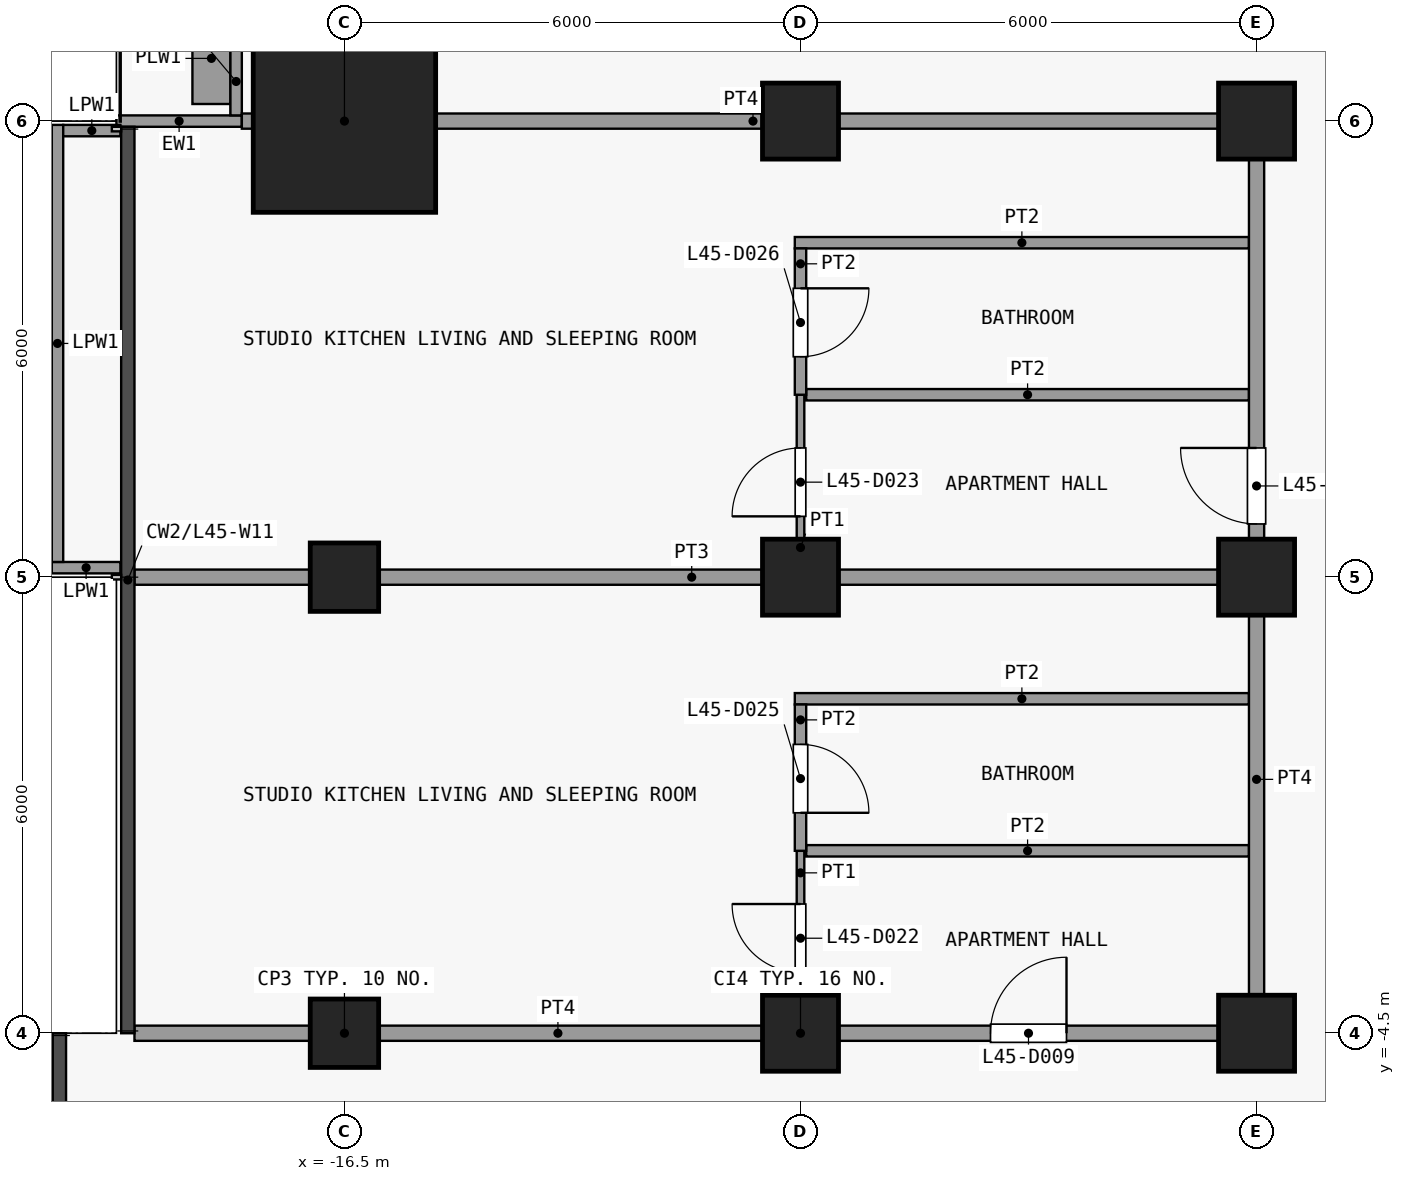
"""IFC4 building model, lengths in metres.
Left out: names, types, materials, properties, quantities, classifications, styles, units other than length and angle.
Written with IfcOpenShell. Run it as: python <this file> out.ifc"""

import sys

from ifc_helpers import new_model, si_unit, direction, frame, frame_2d, origin, origin_2d, place, context, subcontext, project, spatial, rectangle, extrude, element, fill, save


model = new_model("IFC4")
c1 = context("Model", 3, precision=1e-05, world=origin(), true_north=direction((0.0, 1.0)))
c2 = subcontext(c1, "Body", "Model", "MODEL_VIEW")
j1 = project(units=[si_unit("LENGTHUNIT", "METRE"), si_unit("PLANEANGLEUNIT", "RADIAN")], contexts=[c1])
p1 = place(None, origin())
s1 = spatial("IfcSite", under=j1, at=p1, CompositionType="ELEMENT")
p2 = place(p1, origin())
s2 = spatial("IfcBuilding", under=s1, at=p2, CompositionType="ELEMENT")
p3 = place(p2, frame((0.0, 0.0, 181.7)))
s3 = spatial("IfcBuildingStorey", under=s2, at=p3, CompositionType="ELEMENT", Elevation=181.7)
for number, where, z_axis, x_axis in (
    (1, (-16.5, -4.5, 0.0), (0.0, 0.0, 1.0), (1.0, 0.0, 0.0)),
    (2, (-16.5, 1.5, 0.0), (0.0, 0.0, 1.0), (1.0, 0.0, 0.0)),
):
    element("IfcColumn", number, at=place(p3, frame(where, z_axis=z_axis, x_axis=x_axis)), inside=s3, PredefinedType="COLUMN", context=c2, shape_type="SweptSolid", body=[
        extrude(rectangle(XDim=0.9, YDim=0.9, at=origin_2d()), origin(), (0.0, 0.0, 1.0), 3.6),
    ])
p4 = place(p3, frame((-16.5, 7.5, 0.0), z_axis=(0.0, 0.0, 1.0), x_axis=(1.0, 0.0, 0.0)))
e3 = element("IfcColumn", 3, at=p4, inside=s3, PredefinedType="COLUMN", context=c2, shape_type="SweptSolid", body=[
    extrude(rectangle(XDim=2.4, YDim=2.4, at=origin_2d()), origin(), (0.0, 0.0, 1.0), 3.6),
])
for number, where, z_axis, x_axis in (
    (4, (-10.5, -4.5, 0.0), (0.0, 0.0, 1.0), (1.0, 0.0, 0.0)),
    (5, (-10.5, 1.5, 0.0), (0.0, 0.0, 1.0), (1.0, 0.0, 0.0)),
    (6, (-10.5, 7.5, 0.0), (0.0, 0.0, 1.0), (1.0, 0.0, 0.0)),
    (7, (-4.5, -4.5, 0.0), (0.0, 0.0, 1.0), (1.0, 0.0, 0.0)),
    (8, (-4.5, 1.5, 0.0), (0.0, 0.0, 1.0), (1.0, 0.0, 0.0)),
    (9, (-4.5, 7.5, 0.0), (0.0, 0.0, 1.0), (1.0, 0.0, 0.0)),
):
    element("IfcColumn", number, at=place(p3, frame(where, z_axis=z_axis, x_axis=x_axis)), inside=s3, PredefinedType="COLUMN", context=c2, shape_type="SweptSolid", body=[
        extrude(rectangle(XDim=1.0, YDim=1.0, at=origin_2d()), origin(), (0.0, 0.0, 1.0), 3.6),
    ])
p5 = place(p3, frame((-17.85, 7.5, 0.0), z_axis=(0.0, 0.0, 1.0), x_axis=(-1.0, 0.0, 0.0)))
e10 = element("IfcWall", 10, at=p5, inside=s3, PredefinedType="SOLIDWALL", context=c2, shape_type="SweptSolid", body=[
    extrude(rectangle(XDim=1.65, YDim=0.15, at=frame_2d((0.825, 0.0))), origin(), (0.0, 0.0, 1.0), 3.3),
])
p6 = place(p3, frame((-17.925, 7.575, 0.0), z_axis=(0.0, 0.0, 1.0), x_axis=(0.0, 1.0, 0.0)))
e11 = element("IfcWall", 11, at=p6, inside=s3, PredefinedType="SOLIDWALL", context=c2, shape_type="SweptSolid", body=[
    extrude(rectangle(XDim=5.85, YDim=0.15, at=frame_2d((2.925, 0.0))), origin(), (0.0, 0.0, 1.0), 3.3),
])
p7 = place(p6, frame((3.825, 0.0, 0.0)))
e12 = element("IfcOpeningElement", 12, at=p7, cuts=e11, PredefinedType="OPENING", context=c2, shape_type="SweptSolid", body=[
    extrude(rectangle(XDim=1.2, YDim=2.4, at=frame_2d((0.6, 1.2))), frame((0.0, 0.085, 0.0), z_axis=(0.0, -1.0, 0.0), x_axis=(1.0, 0.0, 0.0)), (0.0, 0.0, 1.0), 0.17),
])
p8 = place(p6, frame((1.012, 0.0, 0.9)))
e13 = element("IfcOpeningElement", 13, at=p8, cuts=e11, PredefinedType="OPENING", context=c2, shape_type="SweptSolid", body=[
    extrude(rectangle(XDim=1.8, YDim=2.1, at=frame_2d((0.9, 1.05))), frame((0.0, 0.085, 0.0), z_axis=(0.0, -1.0, 0.0), x_axis=(1.0, 0.0, 0.0)), (0.0, 0.0, 1.0), 0.17),
])
p9 = place(p3, frame((-18.25, 7.725, 0.0), z_axis=(0.0, 0.0, 1.0), x_axis=(0.0, 1.0, 0.0)))
e14 = element("IfcWall", 14, at=p9, inside=s3, PredefinedType="USERDEFINED", context=c2, shape_type="SweptSolid", body=[
    extrude(rectangle(XDim=1.2, YDim=0.5, at=frame_2d((0.6, 0.0))), origin(), (0.0, 0.0, 1.0), 0.9),
])
p10 = place(p3, frame((-19.448, 1.625, 0.0), z_axis=(0.0, 0.0, 1.0), x_axis=(-1.0, 0.0, 0.0)))
e15 = element("IfcWall", 15, at=p10, inside=s3, PredefinedType="PARAPET", context=c2, shape_type="SweptSolid", body=[
    extrude(rectangle(XDim=0.903, YDim=0.15, at=frame_2d((0.451, 0.0))), origin(), (0.0, 0.0, 1.0), 1.15),
])
p11 = place(p3, frame((-20.275, 1.7, 0.0), z_axis=(0.0, 0.0, 1.0), x_axis=(0.0, 1.0, 0.0)))
e16 = element("IfcWall", 16, at=p11, inside=s3, PredefinedType="PARAPET", context=c2, shape_type="SweptSolid", body=[
    extrude(rectangle(XDim=5.75, YDim=0.15, at=frame_2d((2.875, 0.0))), origin(), (0.0, 0.0, 1.0), 1.15),
])
p12 = place(p3, frame((-20.2, 7.375, 0.0), z_axis=(0.0, 0.0, 1.0), x_axis=(1.0, 0.0, 0.0)))
e17 = element("IfcWall", 17, at=p12, inside=s3, PredefinedType="PARAPET", context=c2, shape_type="SweptSolid", body=[
    extrude(rectangle(XDim=0.752, YDim=0.15, at=frame_2d((0.376, 0.0))), origin(), (0.0, 0.0, 1.0), 1.15),
])
p13 = place(p3, frame((-19.262, -4.5, 0.0), z_axis=(0.0, 0.0, 1.0), x_axis=(1.0, 0.0, 0.0)))
e18 = element("IfcWall", 18, at=p13, inside=s3, PredefinedType="PARTITIONING", context=c2, shape_type="SweptSolid", body=[
    extrude(rectangle(XDim=14.863, YDim=0.2, at=frame_2d((7.431, 0.0))), origin(), (0.0, 0.0, 1.0), 3.3),
])
p14 = place(p13, frame((11.262, 0.0, 0.0)))
e19 = element("IfcOpeningElement", 19, at=p14, cuts=e18, PredefinedType="OPENING", context=c2, shape_type="SweptSolid", body=[
    extrude(rectangle(XDim=1.0, YDim=2.1, at=frame_2d((0.5, 1.05))), frame((0.0, 0.11, 0.0), z_axis=(0.0, -1.0, 0.0), x_axis=(1.0, 0.0, 0.0)), (0.0, 0.0, 1.0), 0.22),
])
p15 = place(p3, frame((-10.425, -2.1, 0.0), z_axis=(0.0, 0.0, 1.0), x_axis=(1.0, 0.0, 0.0)))
e20 = element("IfcWall", 20, at=p15, inside=s3, PredefinedType="PARTITIONING", context=c2, shape_type="SweptSolid", body=[
    extrude(rectangle(XDim=5.825, YDim=0.15, at=frame_2d((2.913, 0.0))), origin(), (0.0, 0.0, 1.0), 3.3),
])
p16 = place(p3, frame((-10.575, -0.1, 0.0), z_axis=(0.0, 0.0, 1.0), x_axis=(1.0, 0.0, 0.0)))
e21 = element("IfcWall", 21, at=p16, inside=s3, PredefinedType="PARTITIONING", context=c2, shape_type="SweptSolid", body=[
    extrude(rectangle(XDim=5.975, YDim=0.15, at=frame_2d((2.987, 0.0))), origin(), (0.0, 0.0, 1.0), 3.3),
])
p17 = place(p3, frame((-19.262, 1.5, 0.0), z_axis=(0.0, 0.0, 1.0), x_axis=(1.0, 0.0, 0.0)))
e22 = element("IfcWall", 22, at=p17, inside=s3, PredefinedType="PARTITIONING", context=c2, shape_type="SweptSolid", body=[
    extrude(rectangle(XDim=14.662, YDim=0.2, at=frame_2d((7.331, 0.0))), origin(), (0.0, 0.0, 1.0), 3.3),
])
p18 = place(p3, frame((-10.425, 3.9, 0.0), z_axis=(0.0, 0.0, 1.0), x_axis=(1.0, 0.0, 0.0)))
e23 = element("IfcWall", 23, at=p18, inside=s3, PredefinedType="PARTITIONING", context=c2, shape_type="SweptSolid", body=[
    extrude(rectangle(XDim=5.825, YDim=0.15, at=frame_2d((2.913, 0.0))), origin(), (0.0, 0.0, 1.0), 3.3),
])
p19 = place(p3, frame((-10.575, 5.9, 0.0), z_axis=(0.0, 0.0, 1.0), x_axis=(1.0, 0.0, 0.0)))
e24 = element("IfcWall", 24, at=p19, inside=s3, PredefinedType="PARTITIONING", context=c2, shape_type="SweptSolid", body=[
    extrude(rectangle(XDim=5.975, YDim=0.15, at=frame_2d((2.987, 0.0))), origin(), (0.0, 0.0, 1.0), 3.3),
])
p20 = place(p3, frame((-17.85, 7.5, 0.0), z_axis=(0.0, 0.0, 1.0), x_axis=(1.0, 0.0, 0.0)))
e25 = element("IfcWall", 25, at=p20, inside=s3, PredefinedType="PARTITIONING", context=c2, shape_type="SweptSolid", body=[
    extrude(rectangle(XDim=13.45, YDim=0.2, at=frame_2d((6.725, 0.0))), origin(), (0.0, 0.0, 1.0), 3.3),
])
p21 = place(p3, frame((-10.5, -4.4, 0.0), z_axis=(0.0, 0.0, 1.0), x_axis=(0.0, 1.0, 0.0)))
e26 = element("IfcWall", 26, at=p21, inside=s3, PredefinedType="PARTITIONING", context=c2, shape_type="SweptSolid", body=[
    extrude(rectangle(XDim=2.3, YDim=0.1, at=frame_2d((1.15, 0.0))), origin(), (0.0, 0.0, 1.0), 3.3),
])
p22 = place(p21, frame((0.7, 0.0, 0.0)))
e27 = element("IfcOpeningElement", 27, at=p22, cuts=e26, PredefinedType="OPENING", context=c2, shape_type="SweptSolid", body=[
    extrude(rectangle(XDim=0.9, YDim=2.1, at=frame_2d((0.45, 1.05))), frame((0.0, 0.06, 0.0), z_axis=(0.0, -1.0, 0.0), x_axis=(1.0, 0.0, 0.0)), (0.0, 0.0, 1.0), 0.12),
])
p23 = place(p3, frame((-10.5, 1.6, 0.0), z_axis=(0.0, 0.0, 1.0), x_axis=(0.0, 1.0, 0.0)))
e28 = element("IfcWall", 28, at=p23, inside=s3, PredefinedType="PARTITIONING", context=c2, shape_type="SweptSolid", body=[
    extrude(rectangle(XDim=2.3, YDim=0.1, at=frame_2d((1.15, 0.0))), origin(), (0.0, 0.0, 1.0), 3.3),
])
p24 = place(p23, frame((0.7, 0.0, 0.0)))
e29 = element("IfcOpeningElement", 29, at=p24, cuts=e28, PredefinedType="OPENING", context=c2, shape_type="SweptSolid", body=[
    extrude(rectangle(XDim=0.9, YDim=2.1, at=frame_2d((0.45, 1.05))), frame((0.0, 0.06, 0.0), z_axis=(0.0, -1.0, 0.0), x_axis=(1.0, 0.0, 0.0)), (0.0, 0.0, 1.0), 0.12),
])
p25 = place(p3, frame((-10.5, -2.1, 0.0), z_axis=(0.0, 0.0, 1.0), x_axis=(0.0, 1.0, 0.0)))
e30 = element("IfcWall", 30, at=p25, inside=s3, PredefinedType="PARTITIONING", context=c2, shape_type="SweptSolid", body=[
    extrude(rectangle(XDim=1.925, YDim=0.15, at=frame_2d((0.962, 0.0))), origin(), (0.0, 0.0, 1.0), 3.3),
])
p26 = place(p25, frame((0.5, 0.0, 0.0)))
e31 = element("IfcOpeningElement", 31, at=p26, cuts=e30, PredefinedType="OPENING", context=c2, shape_type="SweptSolid", body=[
    extrude(rectangle(XDim=0.9, YDim=2.1, at=frame_2d((0.45, 1.05))), frame((0.0, 0.085, 0.0), z_axis=(0.0, -1.0, 0.0), x_axis=(1.0, 0.0, 0.0)), (0.0, 0.0, 1.0), 0.17),
])
p27 = place(p3, frame((-10.5, 3.9, 0.0), z_axis=(0.0, 0.0, 1.0), x_axis=(0.0, 1.0, 0.0)))
e32 = element("IfcWall", 32, at=p27, inside=s3, PredefinedType="PARTITIONING", context=c2, shape_type="SweptSolid", body=[
    extrude(rectangle(XDim=1.925, YDim=0.15, at=frame_2d((0.962, 0.0))), origin(), (0.0, 0.0, 1.0), 3.3),
])
p28 = place(p27, frame((0.5, 0.0, 0.0)))
e33 = element("IfcOpeningElement", 33, at=p28, cuts=e32, PredefinedType="OPENING", context=c2, shape_type="SweptSolid", body=[
    extrude(rectangle(XDim=0.9, YDim=2.1, at=frame_2d((0.45, 1.05))), frame((0.0, 0.085, 0.0), z_axis=(0.0, -1.0, 0.0), x_axis=(1.0, 0.0, 0.0)), (0.0, 0.0, 1.0), 0.17),
])
p29 = place(p3, frame((-4.5, -4.4, 0.0), z_axis=(0.0, 0.0, 1.0), x_axis=(0.0, 1.0, 0.0)))
e34 = element("IfcWall", 34, at=p29, inside=s3, PredefinedType="PARTITIONING", context=c2, shape_type="SweptSolid", body=[
    extrude(rectangle(XDim=11.8, YDim=0.2, at=frame_2d((5.9, 0.0))), origin(), (0.0, 0.0, 1.0), 3.3),
])
p30 = place(p29, frame((6.6, 0.0, 0.0)))
e35 = element("IfcOpeningElement", 35, at=p30, cuts=e34, PredefinedType="OPENING", context=c2, shape_type="SweptSolid", body=[
    extrude(rectangle(XDim=1.0, YDim=2.1, at=frame_2d((0.5, 1.05))), frame((0.0, 0.11, 0.0), z_axis=(0.0, -1.0, 0.0), x_axis=(1.0, 0.0, 0.0)), (0.0, 0.0, 1.0), 0.22),
])
p31 = place(p14, origin())
e36 = element("IfcDoor", 36, at=p31, inside=s3, OperationType="SINGLE_SWING_LEFT", PredefinedType="DOOR", context=c2, shape_type="SweptSolid", body=[
    extrude(rectangle(XDim=1.0, YDim=2.1, at=frame_2d((0.5, 1.05))), frame((0.0, 0.025, 0.0), z_axis=(0.0, -1.0, 0.0), x_axis=(1.0, 0.0, 0.0)), (0.0, 0.0, 1.0), 0.05),
])
fill(e19, e36)
p32 = place(p22, origin())
e37 = element("IfcDoor", 37, at=p32, inside=s3, OperationType="SINGLE_SWING_LEFT", PredefinedType="DOOR", context=c2, shape_type="SweptSolid", body=[
    extrude(rectangle(XDim=0.9, YDim=2.1, at=frame_2d((0.45, 1.05))), frame((0.0, 0.025, 0.0), z_axis=(0.0, -1.0, 0.0), x_axis=(1.0, 0.0, 0.0)), (0.0, 0.0, 1.0), 0.05),
])
fill(e27, e37)
p33 = place(p24, origin())
e38 = element("IfcDoor", 38, at=p33, inside=s3, OperationType="SINGLE_SWING_RIGHT", PredefinedType="DOOR", context=c2, shape_type="SweptSolid", body=[
    extrude(rectangle(XDim=0.9, YDim=2.1, at=frame_2d((0.45, 1.05))), frame((0.0, 0.025, 0.0), z_axis=(0.0, -1.0, 0.0), x_axis=(1.0, 0.0, 0.0)), (0.0, 0.0, 1.0), 0.05),
])
fill(e29, e38)
p34 = place(p26, origin())
e39 = element("IfcDoor", 39, at=p34, inside=s3, OperationType="SINGLE_SWING_LEFT", PredefinedType="DOOR", context=c2, shape_type="SweptSolid", body=[
    extrude(rectangle(XDim=0.9, YDim=2.1, at=frame_2d((0.45, 1.05))), frame((0.0, 0.025, 0.0), z_axis=(0.0, -1.0, 0.0), x_axis=(1.0, 0.0, 0.0)), (0.0, 0.0, 1.0), 0.05),
])
fill(e31, e39)
p35 = place(p28, origin())
e40 = element("IfcDoor", 40, at=p35, inside=s3, OperationType="SINGLE_SWING_RIGHT", PredefinedType="DOOR", context=c2, shape_type="SweptSolid", body=[
    extrude(rectangle(XDim=0.9, YDim=2.1, at=frame_2d((0.45, 1.05))), frame((0.0, 0.025, 0.0), z_axis=(0.0, -1.0, 0.0), x_axis=(1.0, 0.0, 0.0)), (0.0, 0.0, 1.0), 0.05),
])
fill(e33, e40)
p36 = place(p30, origin())
e41 = element("IfcDoor", 41, at=p36, inside=s3, OperationType="SINGLE_SWING_LEFT", PredefinedType="DOOR", context=c2, shape_type="SweptSolid", body=[
    extrude(rectangle(XDim=1.0, YDim=2.1, at=frame_2d((0.5, 1.05))), frame((0.0, 0.025, 0.0), z_axis=(0.0, -1.0, 0.0), x_axis=(1.0, 0.0, 0.0)), (0.0, 0.0, 1.0), 0.05),
])
fill(e35, e41)
save(model, sys.argv[1])
